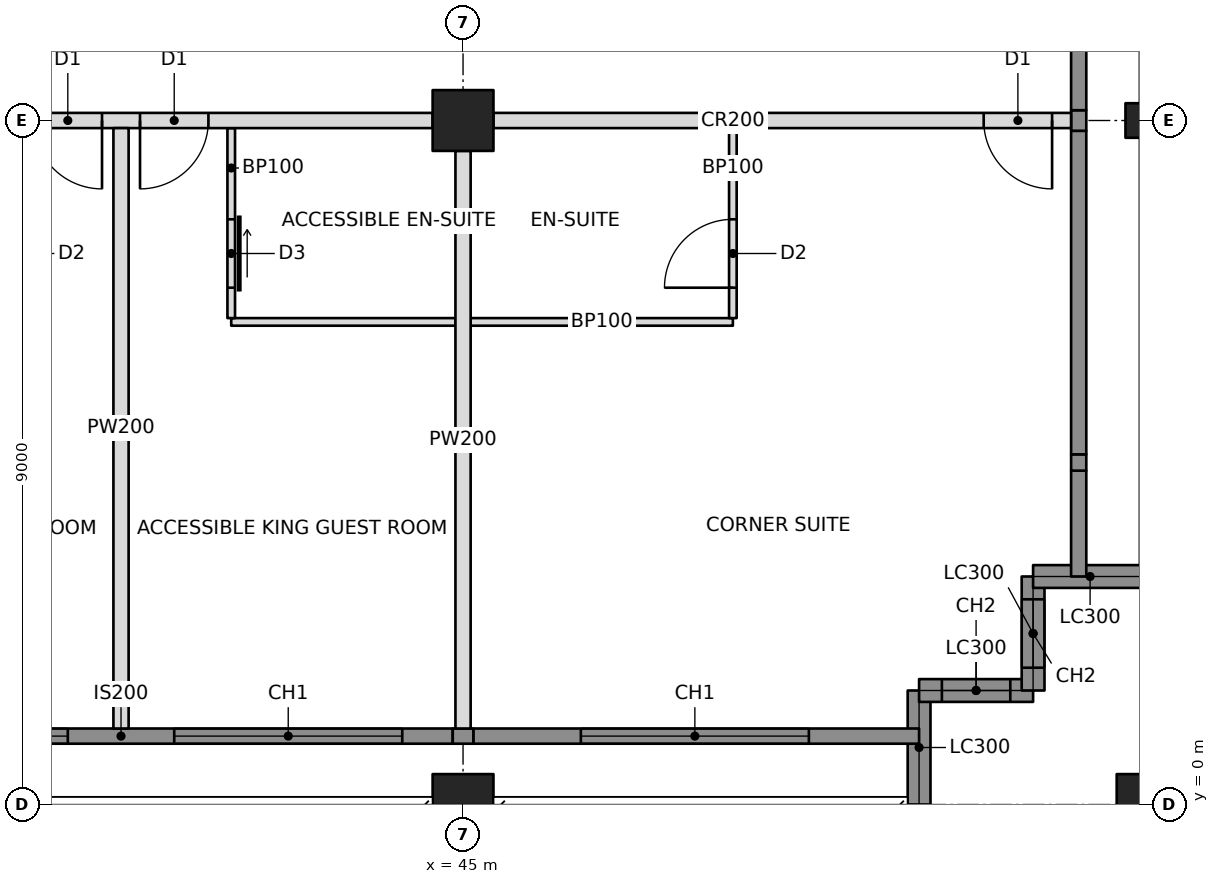
"""IFC4 building model, lengths in metres.
Left out: names, types, materials, properties, quantities, classifications, styles, units other than length and angle.
Written with IfcOpenShell. Run it as: python <this file> out.ifc"""

import sys

from ifc_helpers import new_model, si_unit, direction, frame, frame_2d, origin, origin_2d, place, context, subcontext, project, spatial, rectangle, hollow_rectangle, i_section, extrude, element, fill, save


model = new_model("IFC4")
c1 = context("Model", 3, precision=1e-05, world=origin(), true_north=direction((0.0, 1.0)))
c2 = subcontext(c1, "Body", "Model", "MODEL_VIEW")
j1 = project(units=[si_unit("LENGTHUNIT", "METRE"), si_unit("PLANEANGLEUNIT", "RADIAN")], contexts=[c1])
p1 = place(None, origin())
s1 = spatial("IfcSite", under=j1, at=p1, CompositionType="ELEMENT")
p2 = place(p1, origin())
s2 = spatial("IfcBuilding", under=s1, at=p2, CompositionType="ELEMENT")
p3 = place(p2, frame((0.0, 0.0, 82.4)))
s3 = spatial("IfcBuildingStorey", under=s2, at=p3, CompositionType="ELEMENT", Elevation=82.4)
p4 = place(p3, frame((45.0, 0.0, 0.0), z_axis=(0.0, 0.0, 1.0), x_axis=(1.0, 0.0, 0.0)))
e1 = element("IfcColumn", 1, at=p4, inside=s3, PredefinedType="COLUMN", context=c2, shape_type="SweptSolid", body=[
    extrude(hollow_rectangle(XDim=0.8, YDim=0.8, WallThickness=0.07, at=origin_2d()), origin(), (0.0, 0.0, 1.0), 3.4),
])
p5 = place(p3, frame((45.0, 9.0, 0.0), z_axis=(0.0, 0.0, 1.0), x_axis=(0.0, 1.0, 0.0)))
e2 = element("IfcColumn", 2, at=p5, inside=s3, PredefinedType="COLUMN", context=c2, shape_type="SweptSolid", body=[
    extrude(hollow_rectangle(XDim=0.8, YDim=0.8, WallThickness=0.09, at=origin_2d()), origin(), (0.0, 0.0, 1.0), 3.4),
])
p6 = place(p3, frame((54.0, 0.0, 0.0), z_axis=(0.0, 0.0, 1.0), x_axis=(1.0, 0.0, 0.0)))
e3 = element("IfcColumn", 3, at=p6, inside=s3, PredefinedType="COLUMN", context=c2, shape_type="SweptSolid", body=[
    extrude(hollow_rectangle(XDim=0.8, YDim=0.8, WallThickness=0.07, at=origin_2d()), origin(), (0.0, 0.0, 1.0), 3.4),
])
p7 = place(p3, frame((54.0, 9.0, 0.0), z_axis=(0.0, 0.0, 1.0), x_axis=(0.0, 1.0, 0.0)))
e4 = element("IfcColumn", 4, at=p7, inside=s3, PredefinedType="COLUMN", context=c2, shape_type="SweptSolid", body=[
    extrude(i_section(OverallWidth=0.455, OverallDepth=0.569, WebThickness=0.078, FlangeThickness=0.125, at=origin_2d()), origin(), (0.0, 0.0, 1.0), 3.4),
])
p8 = place(p3, frame((51.0, 0.0, 0.0), z_axis=(0.0, 0.0, 1.0), x_axis=(0.0, 1.0, 0.0)))
e5 = element("IfcWall", 5, at=p8, inside=s3, PredefinedType="SOLIDWALL", context=c2, shape_type="SweptSolid", body=[
    extrude(rectangle(XDim=1.5, YDim=0.3, at=frame_2d((0.75, 0.0))), origin(), (0.0, 0.0, 1.0), 2.42),
])
p9 = place(p3, frame((51.0, 1.5, 0.0), z_axis=(0.0, 0.0, 1.0), x_axis=(1.0, 0.0, 0.0)))
e6 = element("IfcWall", 6, at=p9, inside=s3, PredefinedType="SOLIDWALL", context=c2, shape_type="SweptSolid", body=[
    extrude(rectangle(XDim=1.5, YDim=0.3, at=frame_2d((0.75, 0.0))), origin(), (0.0, 0.0, 1.0), 3.2),
])
p10 = place(p9, frame((0.3, 0.0, 0.6)))
e7 = element("IfcOpeningElement", 7, at=p10, cuts=e6, PredefinedType="OPENING", context=c2, shape_type="SweptSolid", body=[
    extrude(rectangle(XDim=0.9, YDim=2.2, at=frame_2d((0.45, 1.1))), frame((0.0, 0.16, 0.0), z_axis=(0.0, -1.0, 0.0), x_axis=(1.0, 0.0, 0.0)), (0.0, 0.0, 1.0), 0.32),
])
p11 = place(p3, frame((52.5, 1.5, 0.0), z_axis=(0.0, 0.0, 1.0), x_axis=(0.0, 1.0, 0.0)))
e8 = element("IfcWall", 8, at=p11, inside=s3, PredefinedType="SOLIDWALL", context=c2, shape_type="SweptSolid", body=[
    extrude(rectangle(XDim=1.5, YDim=0.3, at=frame_2d((0.75, 0.0))), origin(), (0.0, 0.0, 1.0), 3.2),
])
p12 = place(p11, frame((0.3, 0.0, 0.6)))
e9 = element("IfcOpeningElement", 9, at=p12, cuts=e8, PredefinedType="OPENING", context=c2, shape_type="SweptSolid", body=[
    extrude(rectangle(XDim=0.9, YDim=2.2, at=frame_2d((0.45, 1.1))), frame((0.0, 0.16, 0.0), z_axis=(0.0, -1.0, 0.0), x_axis=(1.0, 0.0, 0.0)), (0.0, 0.0, 1.0), 0.32),
])
p13 = place(p3, frame((52.5, 3.0, 0.0), z_axis=(0.0, 0.0, 1.0), x_axis=(1.0, 0.0, 0.0)))
e10 = element("IfcWall", 10, at=p13, inside=s3, PredefinedType="SOLIDWALL", context=c2, shape_type="SweptSolid", body=[
    extrude(rectangle(XDim=1.5, YDim=0.3, at=frame_2d((0.75, 0.0))), origin(), (0.0, 0.0, 1.0), 2.42),
])
p14 = place(p3, frame((53.1, 3.0, 0.0), z_axis=(0.0, 0.0, 1.0), x_axis=(0.0, 1.0, 0.0)))
e11 = element("IfcWall", 11, at=p14, inside=s3, PredefinedType="SOLIDWALL", context=c2, shape_type="SweptSolid", body=[
    extrude(rectangle(XDim=1.393, YDim=0.2, at=frame_2d((0.696, 0.0))), origin(), (0.0, 0.0, 1.0), 3.2),
])
p15 = place(p3, frame((36.4, 9.0, 0.0), z_axis=(0.0, 0.0, 1.0), x_axis=(1.0, 0.0, 0.0)))
e12 = element("IfcWall", 12, at=p15, inside=s3, PredefinedType="PARTITIONING", context=c2, shape_type="SweptSolid", body=[
    extrude(rectangle(XDim=8.2, YDim=0.2, at=frame_2d((4.1, 0.0))), origin(), (0.0, 0.0, 1.0), 2.438),
])
p16 = place(p15, frame((2.95, 0.0, 0.0)))
e13 = element("IfcOpeningElement", 13, at=p16, cuts=e12, PredefinedType="OPENING", context=c2, shape_type="SweptSolid", body=[
    extrude(rectangle(XDim=0.9, YDim=2.1, at=frame_2d((0.45, 1.05))), frame((0.0, 0.11, 0.0), z_axis=(0.0, -1.0, 0.0), x_axis=(1.0, 0.0, 0.0)), (0.0, 0.0, 1.0), 0.22),
])
p17 = place(p15, frame((4.35, 0.0, 0.0)))
e14 = element("IfcOpeningElement", 14, at=p17, cuts=e12, PredefinedType="OPENING", context=c2, shape_type="SweptSolid", body=[
    extrude(rectangle(XDim=0.9, YDim=2.1, at=frame_2d((0.45, 1.05))), frame((0.0, 0.11, 0.0), z_axis=(0.0, -1.0, 0.0), x_axis=(1.0, 0.0, 0.0)), (0.0, 0.0, 1.0), 0.22),
])
p18 = place(p3, frame((45.4, 9.0, 0.0), z_axis=(0.0, 0.0, 1.0), x_axis=(1.0, 0.0, 0.0)))
e15 = element("IfcWall", 15, at=p18, inside=s3, PredefinedType="PARTITIONING", context=c2, shape_type="SweptSolid", body=[
    extrude(rectangle(XDim=7.6, YDim=0.2, at=frame_2d((3.8, 0.0))), origin(), (0.0, 0.0, 1.0), 2.438),
])
p19 = place(p18, frame((6.45, 0.0, 0.0)))
e16 = element("IfcOpeningElement", 16, at=p19, cuts=e15, PredefinedType="OPENING", context=c2, shape_type="SweptSolid", body=[
    extrude(rectangle(XDim=0.9, YDim=2.1, at=frame_2d((0.45, 1.05))), frame((0.0, 0.11, 0.0), z_axis=(0.0, -1.0, 0.0), x_axis=(1.0, 0.0, 0.0)), (0.0, 0.0, 1.0), 0.22),
])
p20 = place(p3, frame((40.5, 8.9, 0.0), z_axis=(0.0, 0.0, 1.0), x_axis=(0.0, -1.0, 0.0)))
e17 = element("IfcWall", 17, at=p20, inside=s3, PredefinedType="PARTITIONING", context=c2, shape_type="SweptSolid", body=[
    extrude(rectangle(XDim=7.9, YDim=0.2, at=frame_2d((3.95, 0.0))), origin(), (0.0, 0.0, 1.0), 2.438),
])
p21 = place(p3, frame((45.0, 8.6, 0.0), z_axis=(0.0, 0.0, 1.0), x_axis=(0.0, -1.0, 0.0)))
e18 = element("IfcWall", 18, at=p21, inside=s3, PredefinedType="PARTITIONING", context=c2, shape_type="SweptSolid", body=[
    extrude(rectangle(XDim=7.6, YDim=0.2, at=frame_2d((3.8, 0.0))), origin(), (0.0, 0.0, 1.0), 2.438),
])
p22 = place(p3, frame((41.95, 6.35, 0.0), z_axis=(0.0, 0.0, 1.0), x_axis=(1.0, 0.0, 0.0)))
e19 = element("IfcWall", 19, at=p22, inside=s3, PredefinedType="PARTITIONING", context=c2, shape_type="SweptSolid", body=[
    extrude(rectangle(XDim=2.95, YDim=0.1, at=frame_2d((1.475, 0.0))), origin(), (0.0, 0.0, 1.0), 2.438),
])
p23 = place(p3, frame((41.95, 8.9, 0.0), z_axis=(0.0, 0.0, 1.0), x_axis=(0.0, -1.0, 0.0)))
e20 = element("IfcWall", 20, at=p23, inside=s3, PredefinedType="PARTITIONING", context=c2, shape_type="SweptSolid", body=[
    extrude(rectangle(XDim=2.5, YDim=0.1, at=frame_2d((1.25, 0.0))), origin(), (0.0, 0.0, 1.0), 2.438),
])
p24 = place(p23, frame((1.2, 0.0, 0.0)))
e21 = element("IfcOpeningElement", 21, at=p24, cuts=e20, PredefinedType="OPENING", context=c2, shape_type="SweptSolid", body=[
    extrude(rectangle(XDim=0.9, YDim=2.1, at=frame_2d((0.45, 1.05))), frame((0.0, 0.06, 0.0), z_axis=(0.0, -1.0, 0.0), x_axis=(1.0, 0.0, 0.0)), (0.0, 0.0, 1.0), 0.12),
])
p25 = place(p3, frame((45.1, 6.35, 0.0), z_axis=(0.0, 0.0, 1.0), x_axis=(1.0, 0.0, 0.0)))
e22 = element("IfcWall", 22, at=p25, inside=s3, PredefinedType="PARTITIONING", context=c2, shape_type="SweptSolid", body=[
    extrude(rectangle(XDim=3.45, YDim=0.1, at=frame_2d((1.725, 0.0))), origin(), (0.0, 0.0, 1.0), 2.438),
])
p26 = place(p3, frame((48.55, 8.9, 0.0), z_axis=(0.0, 0.0, 1.0), x_axis=(0.0, -1.0, 0.0)))
e23 = element("IfcWall", 23, at=p26, inside=s3, PredefinedType="PARTITIONING", context=c2, shape_type="SweptSolid", body=[
    extrude(rectangle(XDim=2.5, YDim=0.1, at=frame_2d((1.25, 0.0))), origin(), (0.0, 0.0, 1.0), 2.438),
])
p27 = place(p26, frame((1.2, 0.0, 0.0)))
e24 = element("IfcOpeningElement", 24, at=p27, cuts=e23, PredefinedType="OPENING", context=c2, shape_type="SweptSolid", body=[
    extrude(rectangle(XDim=0.9, YDim=2.1, at=frame_2d((0.45, 1.05))), frame((0.0, 0.06, 0.0), z_axis=(0.0, -1.0, 0.0), x_axis=(1.0, 0.0, 0.0)), (0.0, 0.0, 1.0), 0.12),
])
p28 = place(p3, frame((36.135, 0.9, 0.0), z_axis=(0.0, 0.0, 1.0), x_axis=(1.0, 0.0, 0.0)))
e25 = element("IfcWall", 25, at=p28, inside=s3, PredefinedType="SOLIDWALL", context=c2, shape_type="SweptSolid", body=[
    extrude(rectangle(XDim=8.729, YDim=0.2, at=frame_2d((4.365, 0.0))), origin(), (0.0, 0.0, 1.0), 3.2),
])
p29 = place(p28, frame((0.665, 0.0, 0.6)))
e26 = element("IfcOpeningElement", 26, at=p29, cuts=e25, PredefinedType="OPENING", context=c2, shape_type="SweptSolid", body=[
    extrude(rectangle(XDim=3.0, YDim=2.2, at=frame_2d((1.5, 1.1))), frame((0.0, 0.11, 0.0), z_axis=(0.0, -1.0, 0.0), x_axis=(1.0, 0.0, 0.0)), (0.0, 0.0, 1.0), 0.22),
])
p30 = place(p28, frame((5.065, 0.0, 0.6)))
e27 = element("IfcOpeningElement", 27, at=p30, cuts=e25, PredefinedType="OPENING", context=c2, shape_type="SweptSolid", body=[
    extrude(rectangle(XDim=3.0, YDim=2.2, at=frame_2d((1.5, 1.1))), frame((0.0, 0.11, 0.0), z_axis=(0.0, -1.0, 0.0), x_axis=(1.0, 0.0, 0.0)), (0.0, 0.0, 1.0), 0.22),
])
p31 = place(p3, frame((44.865, 0.9, 0.0), z_axis=(0.0, 0.0, 1.0), x_axis=(1.0, 0.0, 0.0)))
e28 = element("IfcWall", 28, at=p31, inside=s3, PredefinedType="SOLIDWALL", context=c2, shape_type="SweptSolid", body=[
    extrude(rectangle(XDim=0.271, YDim=0.2, at=frame_2d((0.135, 0.0))), origin(), (0.0, 0.0, 1.0), 2.438),
])
p32 = place(p3, frame((45.135, 0.9, 0.0), z_axis=(0.0, 0.0, 1.0), x_axis=(1.0, 0.0, 0.0)))
e29 = element("IfcWall", 29, at=p32, inside=s3, PredefinedType="SOLIDWALL", context=c2, shape_type="SweptSolid", body=[
    extrude(rectangle(XDim=5.865, YDim=0.2, at=frame_2d((2.932, 0.0))), origin(), (0.0, 0.0, 1.0), 3.2),
])
p33 = place(p32, frame((1.415, 0.0, 0.6)))
e30 = element("IfcOpeningElement", 30, at=p33, cuts=e29, PredefinedType="OPENING", context=c2, shape_type="SweptSolid", body=[
    extrude(rectangle(XDim=3.0, YDim=2.2, at=frame_2d((1.5, 1.1))), frame((0.0, 0.11, 0.0), z_axis=(0.0, -1.0, 0.0), x_axis=(1.0, 0.0, 0.0)), (0.0, 0.0, 1.0), 0.22),
])
p34 = place(p3, frame((53.1, 4.393, 0.0), z_axis=(0.0, 0.0, 1.0), x_axis=(0.0, 1.0, 0.0)))
e31 = element("IfcWall", 31, at=p34, inside=s3, PredefinedType="SOLIDWALL", context=c2, shape_type="SweptSolid", body=[
    extrude(rectangle(XDim=0.215, YDim=0.2, at=frame_2d((0.107, 0.0))), origin(), (0.0, 0.0, 1.0), 2.661),
])
p35 = place(p3, frame((53.1, 4.607, 0.0), z_axis=(0.0, 0.0, 1.0), x_axis=(0.0, 1.0, 0.0)))
e32 = element("IfcWall", 32, at=p35, inside=s3, PredefinedType="SOLIDWALL", context=c2, shape_type="SweptSolid", body=[
    extrude(rectangle(XDim=4.257, YDim=0.2, at=frame_2d((2.129, 0.0))), origin(), (0.0, 0.0, 1.0), 3.2),
])
p36 = place(p3, frame((53.1, 8.865, 0.0), z_axis=(0.0, 0.0, 1.0), x_axis=(0.0, 1.0, 0.0)))
e33 = element("IfcWall", 33, at=p36, inside=s3, PredefinedType="SOLIDWALL", context=c2, shape_type="SweptSolid", body=[
    extrude(rectangle(XDim=0.271, YDim=0.2, at=frame_2d((0.135, 0.0))), origin(), (0.0, 0.0, 1.0), 2.438),
])
p37 = place(p3, frame((53.1, 9.135, 0.0), z_axis=(0.0, 0.0, 1.0), x_axis=(0.0, 1.0, 0.0)))
e34 = element("IfcWall", 34, at=p37, inside=s3, PredefinedType="SOLIDWALL", context=c2, shape_type="SweptSolid", body=[
    extrude(rectangle(XDim=8.729, YDim=0.2, at=frame_2d((4.365, 0.0))), origin(), (0.0, 0.0, 1.0), 3.2),
])
p38 = place(p37, frame((2.015, 0.0, 0.6)))
e35 = element("IfcOpeningElement", 35, at=p38, cuts=e34, PredefinedType="OPENING", context=c2, shape_type="SweptSolid", body=[
    extrude(rectangle(XDim=3.0, YDim=2.2, at=frame_2d((1.5, 1.1))), frame((0.0, 0.11, 0.0), z_axis=(0.0, -1.0, 0.0), x_axis=(1.0, 0.0, 0.0)), (0.0, 0.0, 1.0), 0.22),
])
p39 = place(p37, frame((5.515, 0.0, 0.6)))
e36 = element("IfcOpeningElement", 36, at=p39, cuts=e34, PredefinedType="OPENING", context=c2, shape_type="SweptSolid", body=[
    extrude(rectangle(XDim=3.0, YDim=2.2, at=frame_2d((1.5, 1.1))), frame((0.0, 0.11, 0.0), z_axis=(0.0, -1.0, 0.0), x_axis=(1.0, 0.0, 0.0)), (0.0, 0.0, 1.0), 0.22),
])
p40 = place(p10, origin())
e37 = element("IfcWindow", 37, at=p40, inside=s3, PartitioningType="SINGLE_PANEL", PredefinedType="WINDOW", context=c2, shape_type="SweptSolid", body=[
    extrude(rectangle(XDim=0.9, YDim=2.2, at=frame_2d((0.45, 1.1))), frame((0.0, 0.03, 0.0), z_axis=(0.0, -1.0, 0.0), x_axis=(1.0, 0.0, 0.0)), (0.0, 0.0, 1.0), 0.06),
])
fill(e7, e37)
p41 = place(p12, origin())
e38 = element("IfcWindow", 38, at=p41, inside=s3, PartitioningType="SINGLE_PANEL", PredefinedType="WINDOW", context=c2, shape_type="SweptSolid", body=[
    extrude(rectangle(XDim=0.9, YDim=2.2, at=frame_2d((0.45, 1.1))), frame((0.0, 0.03, 0.0), z_axis=(0.0, -1.0, 0.0), x_axis=(1.0, 0.0, 0.0)), (0.0, 0.0, 1.0), 0.06),
])
fill(e9, e38)
p42 = place(p29, origin())
e39 = element("IfcWindow", 39, at=p42, inside=s3, PartitioningType="TRIPLE_PANEL_VERTICAL", PredefinedType="WINDOW", context=c2, shape_type="SweptSolid", body=[
    extrude(rectangle(XDim=3.0, YDim=2.2, at=frame_2d((1.5, 1.1))), frame((0.0, 0.03, 0.0), z_axis=(0.0, -1.0, 0.0), x_axis=(1.0, 0.0, 0.0)), (0.0, 0.0, 1.0), 0.06),
])
fill(e26, e39)
p43 = place(p30, origin())
e40 = element("IfcWindow", 40, at=p43, inside=s3, PartitioningType="TRIPLE_PANEL_VERTICAL", PredefinedType="WINDOW", context=c2, shape_type="SweptSolid", body=[
    extrude(rectangle(XDim=3.0, YDim=2.2, at=frame_2d((1.5, 1.1))), frame((0.0, 0.03, 0.0), z_axis=(0.0, -1.0, 0.0), x_axis=(1.0, 0.0, 0.0)), (0.0, 0.0, 1.0), 0.06),
])
fill(e27, e40)
p44 = place(p33, origin())
e41 = element("IfcWindow", 41, at=p44, inside=s3, PartitioningType="TRIPLE_PANEL_VERTICAL", PredefinedType="WINDOW", context=c2, shape_type="SweptSolid", body=[
    extrude(rectangle(XDim=3.0, YDim=2.2, at=frame_2d((1.5, 1.1))), frame((0.0, 0.03, 0.0), z_axis=(0.0, -1.0, 0.0), x_axis=(1.0, 0.0, 0.0)), (0.0, 0.0, 1.0), 0.06),
])
fill(e30, e41)
p45 = place(p16, frame((0.9, 0.0, 0.0), z_axis=(0.0, 0.0, 1.0), x_axis=(-1.0, 0.0, 0.0)))
e42 = element("IfcDoor", 42, at=p45, inside=s3, OperationType="SINGLE_SWING_LEFT", PredefinedType="DOOR", context=c2, shape_type="SweptSolid", body=[
    extrude(rectangle(XDim=0.9, YDim=2.1, at=frame_2d((0.45, 1.05))), frame((0.0, 0.025, 0.0), z_axis=(0.0, -1.0, 0.0), x_axis=(1.0, 0.0, 0.0)), (0.0, 0.0, 1.0), 0.05),
])
fill(e13, e42)
p46 = place(p24, origin())
e43 = element("IfcDoor", 43, at=p46, inside=s3, OperationType="SLIDING_TO_LEFT", PredefinedType="DOOR", context=c2, shape_type="SweptSolid", body=[
    extrude(rectangle(XDim=0.9, YDim=2.1, at=frame_2d((0.45, 1.05))), frame((0.0, 0.025, 0.0), z_axis=(0.0, -1.0, 0.0), x_axis=(1.0, 0.0, 0.0)), (0.0, 0.0, 1.0), 0.05),
])
fill(e21, e43)
p47 = place(p17, frame((0.9, 0.0, 0.0), z_axis=(0.0, 0.0, 1.0), x_axis=(-1.0, 0.0, 0.0)))
e44 = element("IfcDoor", 44, at=p47, inside=s3, OperationType="SINGLE_SWING_RIGHT", PredefinedType="DOOR", context=c2, shape_type="SweptSolid", body=[
    extrude(rectangle(XDim=0.9, YDim=2.1, at=frame_2d((0.45, 1.05))), frame((0.0, 0.025, 0.0), z_axis=(0.0, -1.0, 0.0), x_axis=(1.0, 0.0, 0.0)), (0.0, 0.0, 1.0), 0.05),
])
fill(e14, e44)
p48 = place(p27, frame((0.9, 0.0, 0.0), z_axis=(0.0, 0.0, 1.0), x_axis=(-1.0, 0.0, 0.0)))
e45 = element("IfcDoor", 45, at=p48, inside=s3, OperationType="SINGLE_SWING_LEFT", PredefinedType="DOOR", context=c2, shape_type="SweptSolid", body=[
    extrude(rectangle(XDim=0.9, YDim=2.1, at=frame_2d((0.45, 1.05))), frame((0.0, 0.025, 0.0), z_axis=(0.0, -1.0, 0.0), x_axis=(1.0, 0.0, 0.0)), (0.0, 0.0, 1.0), 0.05),
])
fill(e24, e45)
p49 = place(p19, frame((0.9, 0.0, 0.0), z_axis=(0.0, 0.0, 1.0), x_axis=(-1.0, 0.0, 0.0)))
e46 = element("IfcDoor", 46, at=p49, inside=s3, OperationType="SINGLE_SWING_LEFT", PredefinedType="DOOR", context=c2, shape_type="SweptSolid", body=[
    extrude(rectangle(XDim=0.9, YDim=2.1, at=frame_2d((0.45, 1.05))), frame((0.0, 0.025, 0.0), z_axis=(0.0, -1.0, 0.0), x_axis=(1.0, 0.0, 0.0)), (0.0, 0.0, 1.0), 0.05),
])
fill(e16, e46)
save(model, sys.argv[1])
